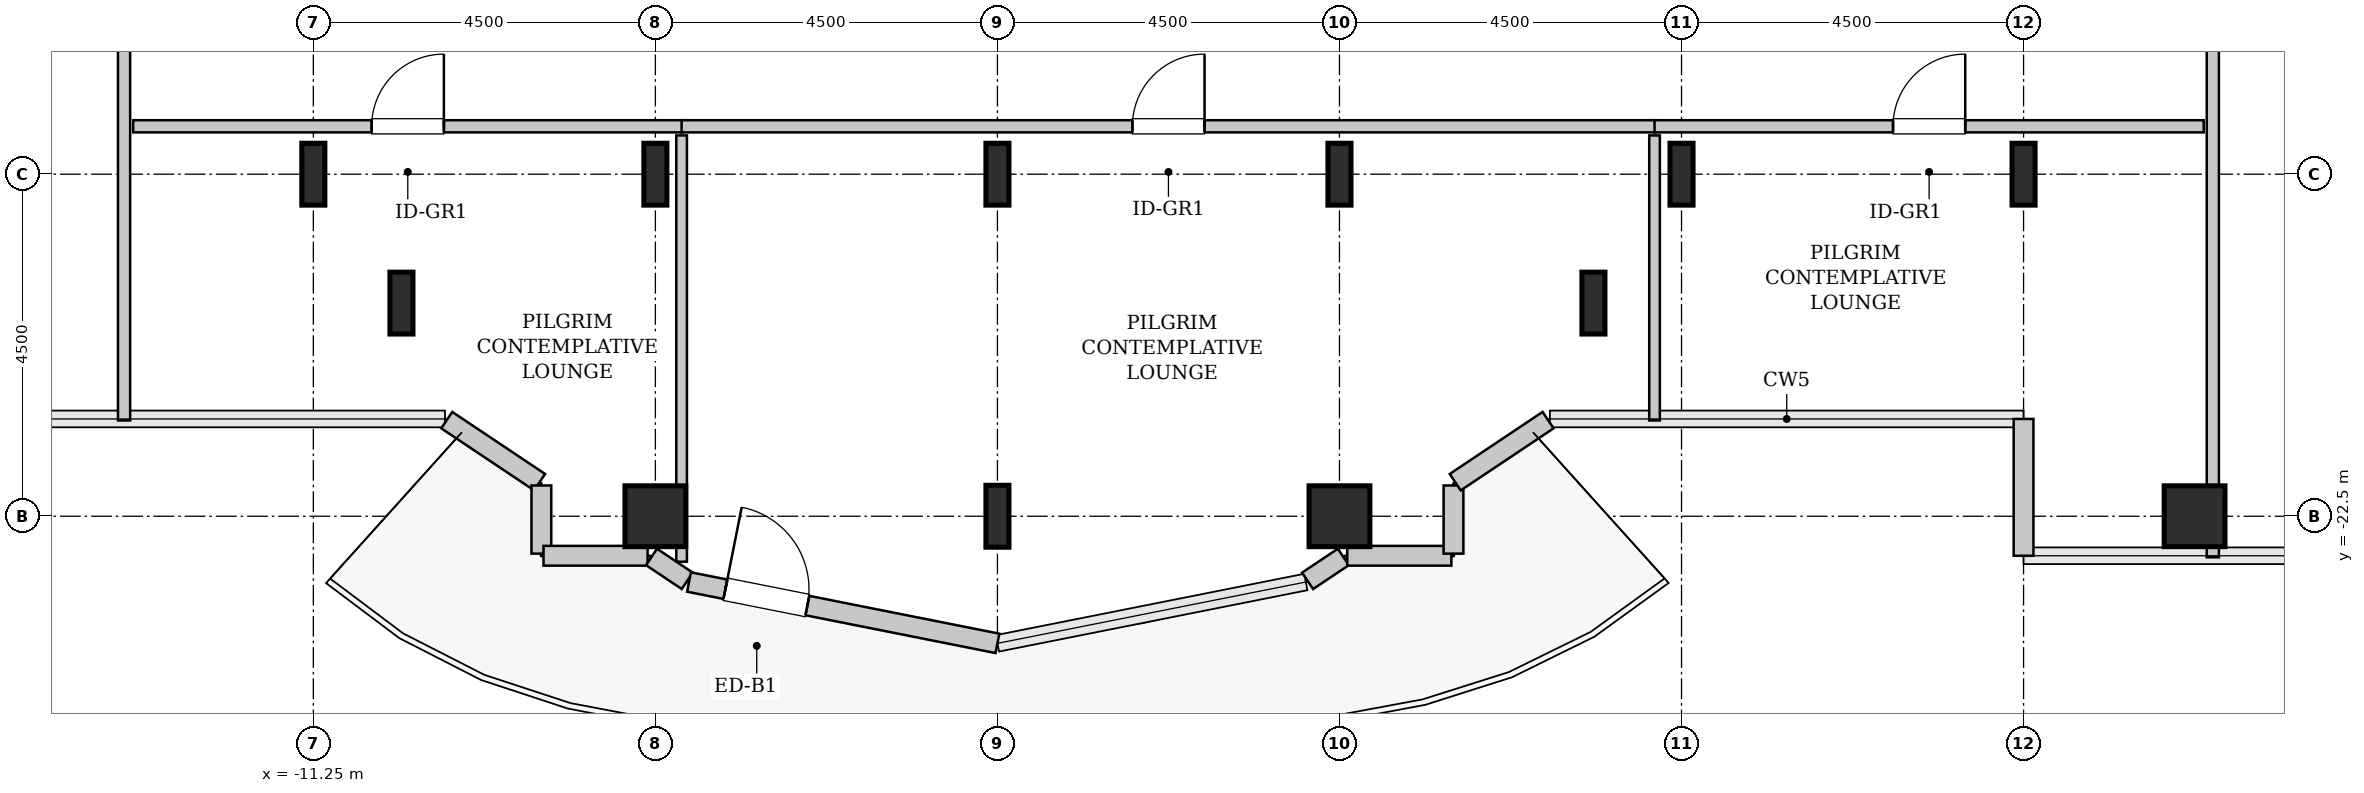
"""IFC4 building model, lengths in metres.
Left out: names, types, materials, properties, quantities, classifications, styles, units other than length and angle.
Written with IfcOpenShell. Run it as: python <this file> out.ifc"""

import sys

from ifc_helpers import new_model, si_unit, direction, frame, frame_2d, origin, origin_2d, place, context, subcontext, project, spatial, rectangle, hollow_rectangle, i_section, extrude, source, transform, mapped, element, fill, save


model = new_model("IFC4")
c1 = context("Model", 3, precision=1e-05, world=origin(), true_north=direction((0.0, 1.0)))
c2 = subcontext(c1, "Body", "Model", "MODEL_VIEW")
j1 = project(units=[si_unit("LENGTHUNIT", "METRE"), si_unit("PLANEANGLEUNIT", "RADIAN")], contexts=[c1])
p1 = place(None, origin())
s1 = spatial("IfcSite", under=j1, at=p1, CompositionType="ELEMENT")
p2 = place(p1, origin())
s2 = spatial("IfcBuilding", under=s1, at=p2, CompositionType="ELEMENT")
p3 = place(p2, frame((0.0, 0.0, 186.8)))
s3 = spatial("IfcBuildingStorey", under=s2, at=p3, CompositionType="ELEMENT", Elevation=186.8)
m1 = source(origin(), c2, "Body", "SweptSolid", [
    extrude(i_section(OverallWidth=0.303, OverallDepth=0.814, WebThickness=0.021, FlangeThickness=0.04, FilletRadius=0.03, at=origin_2d()), origin(), (0.0, 0.0, 1.0), 3.8),
])
for number, where, z_axis, x_axis in (
    (1, (-11.25, -18.0, 0.0), (0.0, 0.0, 1.0), (1.0, 0.0, 0.0)),
    (2, (-10.091, -19.696, 0.0), (0.0, 0.0, 1.0), (1.0, 0.0, 0.0)),
):
    element("IfcColumn", number, at=place(p3, frame(where, z_axis=z_axis, x_axis=x_axis)), inside=s3, PredefinedType="COLUMN", context=c2, shape_type="MappedRepresentation", body=[
        mapped(m1, transform((0.0, 0.0, 0.0), x_axis=(1.0, 0.0, 0.0), y_axis=(0.0, 1.0, 0.0), z_axis=(0.0, 0.0, 1.0), scale=1.0)),
    ])
m2 = source(origin(), c2, "Body", "SweptSolid", [
    extrude(hollow_rectangle(XDim=0.8, YDim=0.8, WallThickness=0.04, InnerFilletRadius=0.04, OuterFilletRadius=0.08, at=origin_2d()), origin(), (0.0, 0.0, 1.0), 3.8),
])
p4 = place(p3, frame((-6.75, -22.5, 0.0), z_axis=(0.0, 0.0, 1.0), x_axis=(1.0, 0.0, 0.0)))
e3 = element("IfcColumn", 3, at=p4, inside=s3, PredefinedType="COLUMN", context=c2, shape_type="MappedRepresentation", body=[
    mapped(m2, transform((0.0, 0.0, 0.0), x_axis=(1.0, 0.0, 0.0), y_axis=(0.0, 1.0, 0.0), z_axis=(0.0, 0.0, 1.0), scale=1.0)),
])
for number, where, z_axis, x_axis in (
    (4, (-6.75, -18.0, 0.0), (0.0, 0.0, 1.0), (1.0, 0.0, 0.0)),
    (5, (-2.25, -22.5, 0.0), (0.0, 0.0, 1.0), (1.0, 0.0, 0.0)),
    (6, (-2.25, -18.0, 0.0), (0.0, 0.0, 1.0), (1.0, 0.0, 0.0)),
):
    element("IfcColumn", number, at=place(p3, frame(where, z_axis=z_axis, x_axis=x_axis)), inside=s3, PredefinedType="COLUMN", context=c2, shape_type="MappedRepresentation", body=[
        mapped(m1, transform((0.0, 0.0, 0.0), x_axis=(1.0, 0.0, 0.0), y_axis=(0.0, 1.0, 0.0), z_axis=(0.0, 0.0, 1.0), scale=1.0)),
    ])
p5 = place(p3, frame((2.25, -22.5, 0.0), z_axis=(0.0, 0.0, 1.0), x_axis=(1.0, 0.0, 0.0)))
e7 = element("IfcColumn", 7, at=p5, inside=s3, PredefinedType="COLUMN", context=c2, shape_type="MappedRepresentation", body=[
    mapped(m2, transform((0.0, 0.0, 0.0), x_axis=(1.0, 0.0, 0.0), y_axis=(0.0, 1.0, 0.0), z_axis=(0.0, 0.0, 1.0), scale=1.0)),
])
for number, where, z_axis, x_axis in (
    (8, (2.25, -18.0, 0.0), (0.0, 0.0, 1.0), (1.0, 0.0, 0.0)),
    (9, (5.591, -19.696, 0.0), (0.0, 0.0, 1.0), (1.0, 0.0, 0.0)),
    (10, (6.75, -18.0, 0.0), (0.0, 0.0, 1.0), (1.0, 0.0, 0.0)),
    (11, (11.25, -18.0, 0.0), (0.0, 0.0, 1.0), (1.0, 0.0, 0.0)),
):
    element("IfcColumn", number, at=place(p3, frame(where, z_axis=z_axis, x_axis=x_axis)), inside=s3, PredefinedType="COLUMN", context=c2, shape_type="MappedRepresentation", body=[
        mapped(m1, transform((0.0, 0.0, 0.0), x_axis=(1.0, 0.0, 0.0), y_axis=(0.0, 1.0, 0.0), z_axis=(0.0, 0.0, 1.0), scale=1.0)),
    ])
p6 = place(p3, frame((13.5, -22.5, 0.0), z_axis=(0.0, 0.0, 1.0), x_axis=(1.0, 0.0, 0.0)))
e12 = element("IfcColumn", 12, at=p6, inside=s3, PredefinedType="COLUMN", context=c2, shape_type="MappedRepresentation", body=[
    mapped(m2, transform((0.0, 0.0, 0.0), x_axis=(1.0, 0.0, 0.0), y_axis=(0.0, 1.0, 0.0), z_axis=(0.0, 0.0, 1.0), scale=1.0)),
])
m3 = source(origin(), c2, "Body", "SweptSolid", [
    extrude(rectangle(XDim=1.8, YDim=0.26, at=frame_2d((0.9, 0.0))), origin(), (0.0, 0.0, 1.0), 3.55),
])
p7 = place(p3, frame((11.25, -21.22, 0.0), z_axis=(0.0, 0.0, 1.0), x_axis=(0.0, -1.0, 0.0)))
e13 = element("IfcWall", 13, at=p7, inside=s3, PredefinedType="SOLIDWALL", context=c2, shape_type="MappedRepresentation", body=[
    mapped(m3, transform((0.0, 0.0, 0.0), x_axis=(1.0, 0.0, 0.0), y_axis=(0.0, 1.0, 0.0), z_axis=(0.0, 0.0, 1.0), scale=1.0)),
])
m4 = source(origin(), c2, "Body", "SweptSolid", [
    extrude(rectangle(XDim=1.469, YDim=0.26, at=frame_2d((0.734, 0.0))), origin(), (0.0, 0.0, 1.0), 3.55),
])
p8 = place(p3, frame((-9.495, -21.236, 0.0), z_axis=(0.0, 0.0, 1.0), x_axis=(0.831461760506, -0.555581983884, 0.0)))
e14 = element("IfcWall", 14, at=p8, inside=s3, PredefinedType="SOLIDWALL", context=c2, shape_type="MappedRepresentation", body=[
    mapped(m4, transform((0.0, 0.0, 0.0), x_axis=(1.0, 0.0, 0.0), y_axis=(0.0, 1.0, 0.0), z_axis=(0.0, 0.0, 1.0), scale=1.0)),
])
m5 = source(origin(), c2, "Body", "SweptSolid", [
    extrude(rectangle(XDim=0.897, YDim=0.26, at=frame_2d((0.448, 0.0))), origin(), (0.0, 0.0, 1.0), 3.55),
])
p9 = place(p3, frame((-8.25, -22.095, 0.0), z_axis=(0.0, 0.0, 1.0), x_axis=(0.0, -1.0, 0.0)))
e15 = element("IfcWall", 15, at=p9, inside=s3, PredefinedType="SOLIDWALL", context=c2, shape_type="MappedRepresentation", body=[
    mapped(m5, transform((0.0, 0.0, 0.0), x_axis=(1.0, 0.0, 0.0), y_axis=(0.0, 1.0, 0.0), z_axis=(0.0, 0.0, 1.0), scale=1.0)),
])
m6 = source(origin(), c2, "Body", "SweptSolid", [
    extrude(rectangle(XDim=1.37, YDim=0.26, at=frame_2d((0.685, 0.0))), origin(), (0.0, 0.0, 1.0), 3.55),
])
p10 = place(p3, frame((-8.222, -23.02, 0.0), z_axis=(0.0, 0.0, 1.0), x_axis=(1.0, 0.0, 0.0)))
e16 = element("IfcWall", 16, at=p10, inside=s3, PredefinedType="SOLIDWALL", context=c2, shape_type="MappedRepresentation", body=[
    mapped(m6, transform((0.0, 0.0, 0.0), x_axis=(1.0, 0.0, 0.0), y_axis=(0.0, 1.0, 0.0), z_axis=(0.0, 0.0, 1.0), scale=1.0)),
])
m7 = source(origin(), c2, "Body", "SweptSolid", [
    extrude(rectangle(XDim=0.565, YDim=0.26, at=frame_2d((0.283, 0.0))), origin(), (0.0, 0.0, 1.0), 3.55),
])
p11 = place(p3, frame((-6.801, -23.036, 0.0), z_axis=(0.0, 0.0, 1.0), x_axis=(0.831651492666, -0.555297933317, 0.0)))
e17 = element("IfcWall", 17, at=p11, inside=s3, PredefinedType="SOLIDWALL", context=c2, shape_type="MappedRepresentation", body=[
    mapped(m7, transform((0.0, 0.0, 0.0), x_axis=(1.0, 0.0, 0.0), y_axis=(0.0, 1.0, 0.0), z_axis=(0.0, 0.0, 1.0), scale=1.0)),
])
m8 = source(origin(), c2, "Body", "SweptSolid", [
    extrude(rectangle(XDim=4.137, YDim=0.26, at=frame_2d((2.068, 0.0))), origin(), (0.0, 0.0, 1.0), 3.55),
])
p12 = place(p3, frame((-6.307, -23.365, 0.0), z_axis=(0.0, 0.0, 1.0), x_axis=(0.980782170794, -0.195105954428, 0.0)))
e18 = element("IfcWall", 18, at=p12, inside=s3, PredefinedType="SOLIDWALL", context=c2, shape_type="MappedRepresentation", body=[
    mapped(m8, transform((0.0, 0.0, 0.0), x_axis=(1.0, 0.0, 0.0), y_axis=(0.0, 1.0, 0.0), z_axis=(0.0, 0.0, 1.0), scale=1.0)),
])
p13 = place(p12, frame((0.488, 0.0, 0.0)))
e19 = element("IfcOpeningElement", 19, at=p13, cuts=e18, PredefinedType="OPENING", context=c2, shape_type="SweptSolid", body=[
    extrude(rectangle(XDim=1.1, YDim=2.2, at=frame_2d((0.55, 1.1))), frame((0.0, 0.14, 0.0), z_axis=(0.0, -1.0, 0.0), x_axis=(1.0, 0.0, 0.0)), (0.0, 0.0, 1.0), 0.28),
])
p14 = place(p3, frame((1.831, -23.35, 0.0), z_axis=(0.0, 0.0, 1.0), x_axis=(0.831651492666, 0.555297933317, 0.0)))
e20 = element("IfcWall", 20, at=p14, inside=s3, PredefinedType="SOLIDWALL", context=c2, shape_type="MappedRepresentation", body=[
    mapped(m7, transform((0.0, 0.0, 0.0), x_axis=(1.0, 0.0, 0.0), y_axis=(0.0, 1.0, 0.0), z_axis=(0.0, 0.0, 1.0), scale=1.0)),
])
p15 = place(p3, frame((2.352, -23.02, 0.0), z_axis=(0.0, 0.0, 1.0), x_axis=(1.0, 0.0, 0.0)))
e21 = element("IfcWall", 21, at=p15, inside=s3, PredefinedType="SOLIDWALL", context=c2, shape_type="MappedRepresentation", body=[
    mapped(m6, transform((0.0, 0.0, 0.0), x_axis=(1.0, 0.0, 0.0), y_axis=(0.0, 1.0, 0.0), z_axis=(0.0, 0.0, 1.0), scale=1.0)),
])
p16 = place(p3, frame((3.75, -22.992, 0.0), z_axis=(0.0, 0.0, 1.0), x_axis=(0.0, 1.0, 0.0)))
e22 = element("IfcWall", 22, at=p16, inside=s3, PredefinedType="SOLIDWALL", context=c2, shape_type="MappedRepresentation", body=[
    mapped(m5, transform((0.0, 0.0, 0.0), x_axis=(1.0, 0.0, 0.0), y_axis=(0.0, 1.0, 0.0), z_axis=(0.0, 0.0, 1.0), scale=1.0)),
])
p17 = place(p3, frame((3.773, -22.052, 0.0), z_axis=(0.0, 0.0, 1.0), x_axis=(0.831461760506, 0.555581983884, 0.0)))
e23 = element("IfcWall", 23, at=p17, inside=s3, PredefinedType="SOLIDWALL", context=c2, shape_type="MappedRepresentation", body=[
    mapped(m4, transform((0.0, 0.0, 0.0), x_axis=(1.0, 0.0, 0.0), y_axis=(0.0, 1.0, 0.0), z_axis=(0.0, 0.0, 1.0), scale=1.0)),
])
m9 = source(origin(), c2, "Body", "SweptSolid", [
    extrude(rectangle(XDim=12.645, YDim=0.16, at=frame_2d((6.323, 0.0))), origin(), (0.0, 0.0, 1.0), 3.535),
])
p18 = place(p3, frame((-13.74, -21.24, 0.0), z_axis=(0.0, 0.0, 1.0), x_axis=(0.0, 1.0, 0.0)))
e24 = element("IfcWall", 24, at=p18, inside=s3, PredefinedType="PARTITIONING", context=c2, shape_type="MappedRepresentation", body=[
    mapped(m9, transform((0.0, 0.0, 0.0), x_axis=(1.0, 0.0, 0.0), y_axis=(0.0, 1.0, 0.0), z_axis=(0.0, 0.0, 1.0), scale=1.0)),
])
p19 = place(p18, frame((7.762, 0.0, 0.0)))
e25 = element("IfcOpeningElement", 25, at=p19, cuts=e24, PredefinedType="OPENING", context=c2, shape_type="SweptSolid", body=[
    extrude(rectangle(XDim=0.95, YDim=2.1, at=frame_2d((0.475, 1.05))), frame((0.0, 0.09, 0.0), z_axis=(0.0, -1.0, 0.0), x_axis=(1.0, 0.0, 0.0)), (0.0, 0.0, 1.0), 0.18),
])
m10 = source(origin(), c2, "Body", "SweptSolid", [
    extrude(rectangle(XDim=8.653, YDim=0.16, at=frame_2d((4.326, 0.0))), origin(), (0.0, 0.0, 1.0), 3.535),
])
p20 = place(p3, frame((13.74, -23.04, 0.0), z_axis=(0.0, 0.0, 1.0), x_axis=(0.0, 1.0, 0.0)))
e26 = element("IfcWall", 26, at=p20, inside=s3, PredefinedType="PARTITIONING", context=c2, shape_type="MappedRepresentation", body=[
    mapped(m10, transform((0.0, 0.0, 0.0), x_axis=(1.0, 0.0, 0.0), y_axis=(0.0, 1.0, 0.0), z_axis=(0.0, 0.0, 1.0), scale=1.0)),
])
p21 = place(p20, frame((6.666, 0.0, 0.0)))
e27 = element("IfcOpeningElement", 27, at=p21, cuts=e26, PredefinedType="OPENING", context=c2, shape_type="SweptSolid", body=[
    extrude(rectangle(XDim=0.95, YDim=2.1, at=frame_2d((0.475, 1.05))), frame((0.0, 0.09, 0.0), z_axis=(0.0, -1.0, 0.0), x_axis=(1.0, 0.0, 0.0)), (0.0, 0.0, 1.0), 0.18),
])
m11 = source(origin(), c2, "Body", "SweptSolid", [
    extrude(rectangle(XDim=7.225, YDim=0.16, at=frame_2d((3.613, 0.0))), origin(), (0.0, 0.0, 1.0), 3.535),
])
p22 = place(p3, frame((-13.62, -17.37, 0.0), z_axis=(0.0, 0.0, 1.0), x_axis=(1.0, 0.0, 0.0)))
e28 = element("IfcWall", 28, at=p22, inside=s3, PredefinedType="PARTITIONING", context=c2, shape_type="MappedRepresentation", body=[
    mapped(m11, transform((0.0, 0.0, 0.0), x_axis=(1.0, 0.0, 0.0), y_axis=(0.0, 1.0, 0.0), z_axis=(0.0, 0.0, 1.0), scale=1.0)),
])
p23 = place(p22, frame((3.137, 0.0, 0.0)))
e29 = element("IfcOpeningElement", 29, at=p23, cuts=e28, PredefinedType="OPENING", context=c2, shape_type="SweptSolid", body=[
    extrude(rectangle(XDim=0.95, YDim=2.1, at=frame_2d((0.475, 1.05))), frame((0.0, 0.09, 0.0), z_axis=(0.0, -1.0, 0.0), x_axis=(1.0, 0.0, 0.0)), (0.0, 0.0, 1.0), 0.18),
])
m12 = source(origin(), c2, "Body", "SweptSolid", [
    extrude(rectangle(XDim=5.608, YDim=0.14, at=frame_2d((2.804, 0.0))), origin(), (0.0, 0.0, 1.0), 2.875),
])
p24 = place(p3, frame((-6.405, -23.098, 0.0), z_axis=(0.0, 0.0, 1.0), x_axis=(0.0, 1.0, 0.0)))
e30 = element("IfcWall", 30, at=p24, inside=s3, PredefinedType="PARTITIONING", context=c2, shape_type="MappedRepresentation", body=[
    mapped(m12, transform((0.0, 0.0, 0.0), x_axis=(1.0, 0.0, 0.0), y_axis=(0.0, 1.0, 0.0), z_axis=(0.0, 0.0, 1.0), scale=1.0)),
])
m13 = source(origin(), c2, "Body", "SweptSolid", [
    extrude(rectangle(XDim=12.81, YDim=0.16, at=frame_2d((6.405, 0.0))), origin(), (0.0, 0.0, 1.0), 3.535),
])
p25 = place(p3, frame((-6.405, -17.37, 0.0), z_axis=(0.0, 0.0, 1.0), x_axis=(1.0, 0.0, 0.0)))
e31 = element("IfcWall", 31, at=p25, inside=s3, PredefinedType="PARTITIONING", context=c2, shape_type="MappedRepresentation", body=[
    mapped(m13, transform((0.0, 0.0, 0.0), x_axis=(1.0, 0.0, 0.0), y_axis=(0.0, 1.0, 0.0), z_axis=(0.0, 0.0, 1.0), scale=1.0)),
])
p26 = place(p25, frame((5.93, 0.0, 0.0)))
e32 = element("IfcOpeningElement", 32, at=p26, cuts=e31, PredefinedType="OPENING", context=c2, shape_type="SweptSolid", body=[
    extrude(rectangle(XDim=0.95, YDim=2.1, at=frame_2d((0.475, 1.05))), frame((0.0, 0.09, 0.0), z_axis=(0.0, -1.0, 0.0), x_axis=(1.0, 0.0, 0.0)), (0.0, 0.0, 1.0), 0.18),
])
m14 = source(origin(), c2, "Body", "SweptSolid", [
    extrude(rectangle(XDim=3.75, YDim=0.14, at=frame_2d((1.875, 0.0))), origin(), (0.0, 0.0, 1.0), 3.535),
])
p27 = place(p3, frame((6.395, -21.24, 0.0), z_axis=(0.0, 0.0, 1.0), x_axis=(0.0, 1.0, 0.0)))
e33 = element("IfcWall", 33, at=p27, inside=s3, PredefinedType="PARTITIONING", context=c2, shape_type="MappedRepresentation", body=[
    mapped(m14, transform((0.0, 0.0, 0.0), x_axis=(1.0, 0.0, 0.0), y_axis=(0.0, 1.0, 0.0), z_axis=(0.0, 0.0, 1.0), scale=1.0)),
])
p28 = place(p3, frame((6.395, -17.37, 0.0), z_axis=(0.0, 0.0, 1.0), x_axis=(1.0, 0.0, 0.0)))
e34 = element("IfcWall", 34, at=p28, inside=s3, PredefinedType="PARTITIONING", context=c2, shape_type="MappedRepresentation", body=[
    mapped(m11, transform((0.0, 0.0, 0.0), x_axis=(1.0, 0.0, 0.0), y_axis=(0.0, 1.0, 0.0), z_axis=(0.0, 0.0, 1.0), scale=1.0)),
])
p29 = place(p28, frame((3.137, 0.0, 0.0)))
e35 = element("IfcOpeningElement", 35, at=p29, cuts=e34, PredefinedType="OPENING", context=c2, shape_type="SweptSolid", body=[
    extrude(rectangle(XDim=0.95, YDim=2.1, at=frame_2d((0.475, 1.05))), frame((0.0, 0.09, 0.0), z_axis=(0.0, -1.0, 0.0), x_axis=(1.0, 0.0, 0.0)), (0.0, 0.0, 1.0), 0.18),
])
m15 = source(origin(), c2, "Body", "SweptSolid", [
    extrude(rectangle(XDim=1.1, YDim=2.2, at=frame_2d((0.55, 1.1))), frame((0.0, 0.025, 0.0), z_axis=(0.0, -1.0, 0.0), x_axis=(1.0, 0.0, 0.0)), (0.0, 0.0, 1.0), 0.05),
])
p30 = place(p13, origin())
e36 = element("IfcDoor", 36, at=p30, inside=s3, OperationType="SINGLE_SWING_LEFT", PredefinedType="DOOR", context=c2, shape_type="MappedRepresentation", body=[
    mapped(m15, transform((0.0, 0.0, 0.0), x_axis=(1.0, 0.0, 0.0), y_axis=(0.0, 1.0, 0.0), z_axis=(0.0, 0.0, 1.0), scale=1.0)),
])
fill(e19, e36)
m16 = source(origin(), c2, "Body", "SweptSolid", [
    extrude(rectangle(XDim=0.95, YDim=2.1, at=frame_2d((0.475, 1.05))), frame((0.0, 0.025, 0.0), z_axis=(0.0, -1.0, 0.0), x_axis=(1.0, 0.0, 0.0)), (0.0, 0.0, 1.0), 0.05),
])
p31 = place(p23, origin())
e37 = element("IfcDoor", 37, at=p31, inside=s3, OperationType="SINGLE_SWING_RIGHT", PredefinedType="DOOR", context=c2, shape_type="MappedRepresentation", body=[
    mapped(m16, transform((0.0, 0.0, 0.0), x_axis=(1.0, 0.0, 0.0), y_axis=(0.0, 1.0, 0.0), z_axis=(0.0, 0.0, 1.0), scale=1.0)),
])
fill(e29, e37)
p32 = place(p26, origin())
e38 = element("IfcDoor", 38, at=p32, inside=s3, OperationType="SINGLE_SWING_RIGHT", PredefinedType="DOOR", context=c2, shape_type="MappedRepresentation", body=[
    mapped(m16, transform((0.0, 0.0, 0.0), x_axis=(1.0, 0.0, 0.0), y_axis=(0.0, 1.0, 0.0), z_axis=(0.0, 0.0, 1.0), scale=1.0)),
])
fill(e32, e38)
p33 = place(p29, origin())
e39 = element("IfcDoor", 39, at=p33, inside=s3, OperationType="SINGLE_SWING_RIGHT", PredefinedType="DOOR", context=c2, shape_type="MappedRepresentation", body=[
    mapped(m16, transform((0.0, 0.0, 0.0), x_axis=(1.0, 0.0, 0.0), y_axis=(0.0, 1.0, 0.0), z_axis=(0.0, 0.0, 1.0), scale=1.0)),
])
fill(e35, e39)
save(model, sys.argv[1])
